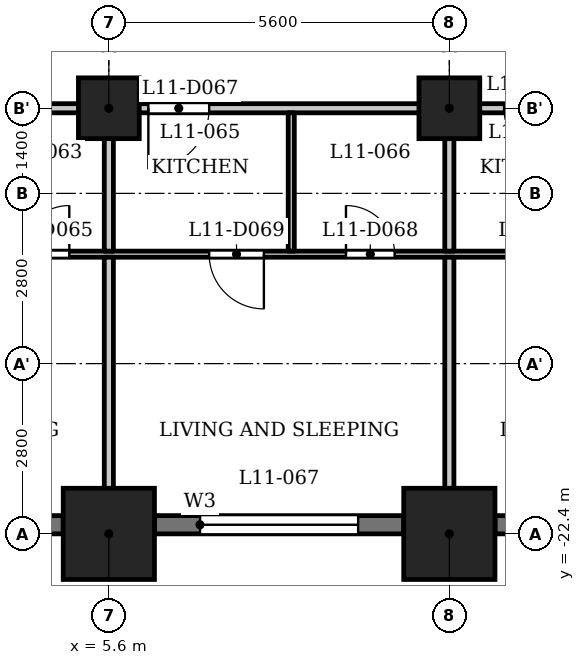
"""IFC4 building model, lengths in metres.
Left out: names, types, materials, properties, quantities, classifications, styles, units other than length and angle.
Written with IfcOpenShell. Run it as: python <this file> out.ifc"""

import sys

from ifc_helpers import new_model, si_unit, direction, frame, frame_2d, origin, origin_2d, place, context, subcontext, project, spatial, rectangle, extrude, element, fill, save


model = new_model("IFC4")
c1 = context("Model", 3, precision=1e-05, world=origin(), true_north=direction((0.0, 1.0)))
c2 = subcontext(c1, "Body", "Model", "MODEL_VIEW")
j1 = project(units=[si_unit("LENGTHUNIT", "METRE"), si_unit("PLANEANGLEUNIT", "RADIAN")], contexts=[c1])
p1 = place(None, origin())
s1 = spatial("IfcSite", under=j1, at=p1, CompositionType="ELEMENT")
p2 = place(p1, origin())
s2 = spatial("IfcBuilding", under=s1, at=p2, CompositionType="ELEMENT")
p3 = place(p2, frame((0.0, 0.0, 48.0)))
s3 = spatial("IfcBuildingStorey", under=s2, at=p3, CompositionType="ELEMENT", Elevation=48.0)
for number, where, z_axis, x_axis in (
    (1, (5.6, -22.4, 0.0), (0.0, 0.0, 1.0), (1.0, 0.0, 0.0)),
    (2, (11.2, -22.4, 0.0), (0.0, 0.0, 1.0), (1.0, 0.0, 0.0)),
):
    element("IfcColumn", number, at=place(p3, frame(where, z_axis=z_axis, x_axis=x_axis)), inside=s3, PredefinedType="COLUMN", context=c2, shape_type="SweptSolid", body=[
        extrude(rectangle(XDim=1.5, YDim=1.5, at=origin_2d()), origin(), (0.0, 0.0, 1.0), 3.5),
    ])
for number, where, z_axis, x_axis in (
    (3, (5.6, -15.4, 0.0), (0.0, 0.0, 1.0), (1.0, 0.0, 0.0)),
    (4, (11.2, -15.4, 0.0), (0.0, 0.0, 1.0), (1.0, 0.0, 0.0)),
):
    element("IfcColumn", number, at=place(p3, frame(where, z_axis=z_axis, x_axis=x_axis)), inside=s3, PredefinedType="COLUMN", context=c2, shape_type="SweptSolid", body=[
        extrude(rectangle(XDim=1.0, YDim=1.0, at=origin_2d()), origin(), (0.0, 0.0, 1.0), 3.5),
    ])
p4 = place(p3, frame((0.75, -22.25, 0.0), z_axis=(0.0, 0.0, 1.0), x_axis=(1.0, 0.0, 0.0)))
e5 = element("IfcWall", 5, at=p4, inside=s3, PredefinedType="SOLIDWALL", context=c2, shape_type="SweptSolid", body=[
    extrude(rectangle(XDim=4.1, YDim=0.3, at=frame_2d((2.05, 0.0))), origin(), (0.0, 0.0, 1.0), 2.35),
])
p5 = place(p4, frame((0.25, 0.0, 1.2)))
e6 = element("IfcOpeningElement", 6, at=p5, cuts=e5, PredefinedType="OPENING", context=c2, shape_type="SweptSolid", body=[
    extrude(rectangle(XDim=3.6, YDim=0.95, at=frame_2d((1.8, 0.475))), frame((0.0, 0.16, 0.0), z_axis=(0.0, -1.0, 0.0), x_axis=(1.0, 0.0, 0.0)), (0.0, 0.0, 1.0), 0.32),
])
p6 = place(p3, frame((6.35, -22.25, 0.0), z_axis=(0.0, 0.0, 1.0), x_axis=(1.0, 0.0, 0.0)))
e7 = element("IfcWall", 7, at=p6, inside=s3, PredefinedType="SOLIDWALL", context=c2, shape_type="SweptSolid", body=[
    extrude(rectangle(XDim=4.1, YDim=0.3, at=frame_2d((2.05, 0.0))), origin(), (0.0, 0.0, 1.0), 2.35),
])
p7 = place(p6, frame((0.75, 0.0, 0.9)))
e8 = element("IfcOpeningElement", 8, at=p7, cuts=e7, PredefinedType="OPENING", context=c2, shape_type="SweptSolid", body=[
    extrude(rectangle(XDim=2.6, YDim=1.25, at=frame_2d((1.3, 0.625))), frame((0.0, 0.16, 0.0), z_axis=(0.0, -1.0, 0.0), x_axis=(1.0, 0.0, 0.0)), (0.0, 0.0, 1.0), 0.32),
])
p8 = place(p3, frame((11.95, -22.25, 0.0), z_axis=(0.0, 0.0, 1.0), x_axis=(1.0, 0.0, 0.0)))
e9 = element("IfcWall", 9, at=p8, inside=s3, PredefinedType="SOLIDWALL", context=c2, shape_type="SweptSolid", body=[
    extrude(rectangle(XDim=4.1, YDim=0.3, at=frame_2d((2.05, 0.0))), origin(), (0.0, 0.0, 1.0), 2.35),
])
p9 = place(p8, frame((0.75, 0.0, 0.9)))
e10 = element("IfcOpeningElement", 10, at=p9, cuts=e9, PredefinedType="OPENING", context=c2, shape_type="SweptSolid", body=[
    extrude(rectangle(XDim=2.6, YDim=1.25, at=frame_2d((1.3, 0.625))), frame((0.0, 0.16, 0.0), z_axis=(0.0, -1.0, 0.0), x_axis=(1.0, 0.0, 0.0)), (0.0, 0.0, 1.0), 0.32),
])
p10 = place(p3, frame((-26.394, -17.8, 0.0), z_axis=(0.0, 0.0, 1.0), x_axis=(1.0, 0.0, 0.0)))
e11 = element("IfcWall", 11, at=p10, inside=s3, PredefinedType="PARTITIONING", context=c2, shape_type="SweptSolid", body=[
    extrude(rectangle(XDim=53.126, YDim=0.1, at=frame_2d((26.563, 0.0))), origin(), (0.0, 0.0, 1.0), 3.2),
])
p11 = place(p10, frame((0.794, 0.0, 0.0)))
e12 = element("IfcOpeningElement", 12, at=p11, cuts=e11, PredefinedType="OPENING", context=c2, shape_type="SweptSolid", body=[
    extrude(rectangle(XDim=0.8, YDim=2.1, at=frame_2d((0.4, 1.05))), frame((0.0, 0.06, 0.0), z_axis=(0.0, -1.0, 0.0), x_axis=(1.0, 0.0, 0.0)), (0.0, 0.0, 1.0), 0.12),
])
p12 = place(p10, frame((5.644, 0.0, 0.0)))
e13 = element("IfcOpeningElement", 13, at=p12, cuts=e11, PredefinedType="OPENING", context=c2, shape_type="SweptSolid", body=[
    extrude(rectangle(XDim=0.9, YDim=2.1, at=frame_2d((0.45, 1.05))), frame((0.0, 0.06, 0.0), z_axis=(0.0, -1.0, 0.0), x_axis=(1.0, 0.0, 0.0)), (0.0, 0.0, 1.0), 0.12),
])
p13 = place(p10, frame((10.394, 0.0, 0.0)))
e14 = element("IfcOpeningElement", 14, at=p13, cuts=e11, PredefinedType="OPENING", context=c2, shape_type="SweptSolid", body=[
    extrude(rectangle(XDim=0.8, YDim=2.1, at=frame_2d((0.4, 1.05))), frame((0.0, 0.06, 0.0), z_axis=(0.0, -1.0, 0.0), x_axis=(1.0, 0.0, 0.0)), (0.0, 0.0, 1.0), 0.12),
])
p14 = place(p10, frame((13.244, 0.0, 0.0)))
e15 = element("IfcOpeningElement", 15, at=p14, cuts=e11, PredefinedType="OPENING", context=c2, shape_type="SweptSolid", body=[
    extrude(rectangle(XDim=0.9, YDim=2.1, at=frame_2d((0.45, 1.05))), frame((0.0, 0.06, 0.0), z_axis=(0.0, -1.0, 0.0), x_axis=(1.0, 0.0, 0.0)), (0.0, 0.0, 1.0), 0.12),
])
p15 = place(p10, frame((23.944, 0.0, 0.0)))
e16 = element("IfcOpeningElement", 16, at=p15, cuts=e11, PredefinedType="OPENING", context=c2, shape_type="SweptSolid", body=[
    extrude(rectangle(XDim=0.8, YDim=2.1, at=frame_2d((0.4, 1.05))), frame((0.0, 0.06, 0.0), z_axis=(0.0, -1.0, 0.0), x_axis=(1.0, 0.0, 0.0)), (0.0, 0.0, 1.0), 0.12),
])
p16 = place(p10, frame((22.194, 0.0, 0.0)))
e17 = element("IfcOpeningElement", 17, at=p16, cuts=e11, PredefinedType="OPENING", context=c2, shape_type="SweptSolid", body=[
    extrude(rectangle(XDim=0.9, YDim=2.1, at=frame_2d((0.45, 1.05))), frame((0.0, 0.06, 0.0), z_axis=(0.0, -1.0, 0.0), x_axis=(1.0, 0.0, 0.0)), (0.0, 0.0, 1.0), 0.12),
])
p17 = place(p10, frame((16.594, 0.0, 0.0)))
e18 = element("IfcOpeningElement", 18, at=p17, cuts=e11, PredefinedType="OPENING", context=c2, shape_type="SweptSolid", body=[
    extrude(rectangle(XDim=0.9, YDim=2.1, at=frame_2d((0.45, 1.05))), frame((0.0, 0.06, 0.0), z_axis=(0.0, -1.0, 0.0), x_axis=(1.0, 0.0, 0.0)), (0.0, 0.0, 1.0), 0.12),
])
p18 = place(p10, frame((18.844, 0.0, 0.0)))
e19 = element("IfcOpeningElement", 19, at=p18, cuts=e11, PredefinedType="OPENING", context=c2, shape_type="SweptSolid", body=[
    extrude(rectangle(XDim=0.9, YDim=2.1, at=frame_2d((0.45, 1.05))), frame((0.0, 0.06, 0.0), z_axis=(0.0, -1.0, 0.0), x_axis=(1.0, 0.0, 0.0)), (0.0, 0.0, 1.0), 0.12),
])
p19 = place(p10, frame((30.544, 0.0, 0.0)))
e20 = element("IfcOpeningElement", 20, at=p19, cuts=e11, PredefinedType="OPENING", context=c2, shape_type="SweptSolid", body=[
    extrude(rectangle(XDim=0.8, YDim=2.1, at=frame_2d((0.4, 1.05))), frame((0.0, 0.06, 0.0), z_axis=(0.0, -1.0, 0.0), x_axis=(1.0, 0.0, 0.0)), (0.0, 0.0, 1.0), 0.12),
])
p20 = place(p10, frame((27.294, 0.0, 0.0)))
e21 = element("IfcOpeningElement", 21, at=p20, cuts=e11, PredefinedType="OPENING", context=c2, shape_type="SweptSolid", body=[
    extrude(rectangle(XDim=0.9, YDim=2.1, at=frame_2d((0.45, 1.05))), frame((0.0, 0.06, 0.0), z_axis=(0.0, -1.0, 0.0), x_axis=(1.0, 0.0, 0.0)), (0.0, 0.0, 1.0), 0.12),
])
p21 = place(p10, frame((35.894, 0.0, 0.0)))
e22 = element("IfcOpeningElement", 22, at=p21, cuts=e11, PredefinedType="OPENING", context=c2, shape_type="SweptSolid", body=[
    extrude(rectangle(XDim=0.8, YDim=2.1, at=frame_2d((0.4, 1.05))), frame((0.0, 0.06, 0.0), z_axis=(0.0, -1.0, 0.0), x_axis=(1.0, 0.0, 0.0)), (0.0, 0.0, 1.0), 0.12),
])
p22 = place(p10, frame((33.644, 0.0, 0.0)))
e23 = element("IfcOpeningElement", 23, at=p22, cuts=e11, PredefinedType="OPENING", context=c2, shape_type="SweptSolid", body=[
    extrude(rectangle(XDim=0.9, YDim=2.1, at=frame_2d((0.45, 1.05))), frame((0.0, 0.06, 0.0), z_axis=(0.0, -1.0, 0.0), x_axis=(1.0, 0.0, 0.0)), (0.0, 0.0, 1.0), 0.12),
])
p23 = place(p10, frame((41.494, 0.0, 0.0)))
e24 = element("IfcOpeningElement", 24, at=p23, cuts=e11, PredefinedType="OPENING", context=c2, shape_type="SweptSolid", body=[
    extrude(rectangle(XDim=0.8, YDim=2.1, at=frame_2d((0.4, 1.05))), frame((0.0, 0.06, 0.0), z_axis=(0.0, -1.0, 0.0), x_axis=(1.0, 0.0, 0.0)), (0.0, 0.0, 1.0), 0.12),
])
p24 = place(p10, frame((38.744, 0.0, 0.0)))
e25 = element("IfcOpeningElement", 25, at=p24, cuts=e11, PredefinedType="OPENING", context=c2, shape_type="SweptSolid", body=[
    extrude(rectangle(XDim=0.9, YDim=2.1, at=frame_2d((0.45, 1.05))), frame((0.0, 0.06, 0.0), z_axis=(0.0, -1.0, 0.0), x_axis=(1.0, 0.0, 0.0)), (0.0, 0.0, 1.0), 0.12),
])
p25 = place(p10, frame((49.362, 0.0, 0.0)))
e26 = element("IfcOpeningElement", 26, at=p25, cuts=e11, PredefinedType="OPENING", context=c2, shape_type="SweptSolid", body=[
    extrude(rectangle(XDim=0.8, YDim=2.1, at=frame_2d((0.4, 1.05))), frame((0.0, 0.06, 0.0), z_axis=(0.0, -1.0, 0.0), x_axis=(1.0, 0.0, 0.0)), (0.0, 0.0, 1.0), 0.12),
])
p26 = place(p10, frame((45.094, 0.0, 0.0)))
e27 = element("IfcOpeningElement", 27, at=p26, cuts=e11, PredefinedType="OPENING", context=c2, shape_type="SweptSolid", body=[
    extrude(rectangle(XDim=0.9, YDim=2.1, at=frame_2d((0.45, 1.05))), frame((0.0, 0.06, 0.0), z_axis=(0.0, -1.0, 0.0), x_axis=(1.0, 0.0, 0.0)), (0.0, 0.0, 1.0), 0.12),
])
p27 = place(p3, frame((-27.484, -15.4, 0.0), z_axis=(0.0, 0.0, 1.0), x_axis=(1.0, 0.0, 0.0)))
e28 = element("IfcWall", 28, at=p27, inside=s3, PredefinedType="PARTITIONING", context=c2, shape_type="SweptSolid", body=[
    extrude(rectangle(XDim=54.968, YDim=0.15, at=frame_2d((27.484, 0.0))), origin(), (0.0, 0.0, 1.0), 3.2),
])
p28 = place(p27, frame((5.734, 0.0, 0.0)))
e29 = element("IfcOpeningElement", 29, at=p28, cuts=e28, PredefinedType="OPENING", context=c2, shape_type="SweptSolid", body=[
    extrude(rectangle(XDim=1.0, YDim=2.1, at=frame_2d((0.5, 1.05))), frame((0.0, 0.085, 0.0), z_axis=(0.0, -1.0, 0.0), x_axis=(1.0, 0.0, 0.0)), (0.0, 0.0, 1.0), 0.17),
])
p29 = place(p27, frame((13.334, 0.0, 0.0)))
e30 = element("IfcOpeningElement", 30, at=p29, cuts=e28, PredefinedType="OPENING", context=c2, shape_type="SweptSolid", body=[
    extrude(rectangle(XDim=1.0, YDim=2.1, at=frame_2d((0.5, 1.05))), frame((0.0, 0.085, 0.0), z_axis=(0.0, -1.0, 0.0), x_axis=(1.0, 0.0, 0.0)), (0.0, 0.0, 1.0), 0.17),
])
p30 = place(p27, frame((20.184, 0.0, 0.0)))
e31 = element("IfcOpeningElement", 31, at=p30, cuts=e28, PredefinedType="OPENING", context=c2, shape_type="SweptSolid", body=[
    extrude(rectangle(XDim=1.0, YDim=2.1, at=frame_2d((0.5, 1.05))), frame((0.0, 0.085, 0.0), z_axis=(0.0, -1.0, 0.0), x_axis=(1.0, 0.0, 0.0)), (0.0, 0.0, 1.0), 0.17),
])
p31 = place(p27, frame((29.384, 0.0, 0.0)))
e32 = element("IfcOpeningElement", 32, at=p31, cuts=e28, PredefinedType="OPENING", context=c2, shape_type="SweptSolid", body=[
    extrude(rectangle(XDim=1.0, YDim=2.1, at=frame_2d((0.5, 1.05))), frame((0.0, 0.085, 0.0), z_axis=(0.0, -1.0, 0.0), x_axis=(1.0, 0.0, 0.0)), (0.0, 0.0, 1.0), 0.17),
])
p32 = place(p27, frame((33.734, 0.0, 0.0)))
e33 = element("IfcOpeningElement", 33, at=p32, cuts=e28, PredefinedType="OPENING", context=c2, shape_type="SweptSolid", body=[
    extrude(rectangle(XDim=1.0, YDim=2.1, at=frame_2d((0.5, 1.05))), frame((0.0, 0.085, 0.0), z_axis=(0.0, -1.0, 0.0), x_axis=(1.0, 0.0, 0.0)), (0.0, 0.0, 1.0), 0.17),
])
p33 = place(p27, frame((39.584, 0.0, 0.0)))
e34 = element("IfcOpeningElement", 34, at=p33, cuts=e28, PredefinedType="OPENING", context=c2, shape_type="SweptSolid", body=[
    extrude(rectangle(XDim=1.0, YDim=2.1, at=frame_2d((0.5, 1.05))), frame((0.0, 0.085, 0.0), z_axis=(0.0, -1.0, 0.0), x_axis=(1.0, 0.0, 0.0)), (0.0, 0.0, 1.0), 0.17),
])
p34 = place(p27, frame((45.184, 0.0, 0.0)))
e35 = element("IfcOpeningElement", 35, at=p34, cuts=e28, PredefinedType="OPENING", context=c2, shape_type="SweptSolid", body=[
    extrude(rectangle(XDim=1.0, YDim=2.1, at=frame_2d((0.5, 1.05))), frame((0.0, 0.085, 0.0), z_axis=(0.0, -1.0, 0.0), x_axis=(1.0, 0.0, 0.0)), (0.0, 0.0, 1.0), 0.17),
])
p35 = place(p3, frame((5.6, -23.13, 0.0), z_axis=(0.0, 0.0, 1.0), x_axis=(0.0, 1.0, 0.0)))
e36 = element("IfcWall", 36, at=p35, inside=s3, PredefinedType="PARTITIONING", context=c2, shape_type="SweptSolid", body=[
    extrude(rectangle(XDim=5.28, YDim=0.15, at=frame_2d((2.64, 0.0))), origin(), (0.0, 0.0, 1.0), 3.2),
])
p36 = place(p3, frame((5.6, -17.75, 0.0), z_axis=(0.0, 0.0, 1.0), x_axis=(0.0, 1.0, 0.0)))
e37 = element("IfcWall", 37, at=p36, inside=s3, PredefinedType="PARTITIONING", context=c2, shape_type="SweptSolid", body=[
    extrude(rectangle(XDim=2.275, YDim=0.15, at=frame_2d((1.137, 0.0))), origin(), (0.0, 0.0, 1.0), 3.2),
])
p37 = place(p3, frame((8.6, -17.75, 0.0), z_axis=(0.0, 0.0, 1.0), x_axis=(0.0, 1.0, 0.0)))
e38 = element("IfcWall", 38, at=p37, inside=s3, PredefinedType="PARTITIONING", context=c2, shape_type="SweptSolid", body=[
    extrude(rectangle(XDim=2.275, YDim=0.1, at=frame_2d((1.137, 0.0))), origin(), (0.0, 0.0, 1.0), 3.2),
])
p38 = place(p3, frame((11.2, -23.13, 0.0), z_axis=(0.0, 0.0, 1.0), x_axis=(0.0, 1.0, 0.0)))
e39 = element("IfcWall", 39, at=p38, inside=s3, PredefinedType="PARTITIONING", context=c2, shape_type="SweptSolid", body=[
    extrude(rectangle(XDim=5.28, YDim=0.15, at=frame_2d((2.64, 0.0))), origin(), (0.0, 0.0, 1.0), 3.2),
])
p39 = place(p3, frame((11.2, -17.75, 0.0), z_axis=(0.0, 0.0, 1.0), x_axis=(0.0, 1.0, 0.0)))
e40 = element("IfcWall", 40, at=p39, inside=s3, PredefinedType="PARTITIONING", context=c2, shape_type="SweptSolid", body=[
    extrude(rectangle(XDim=2.275, YDim=0.15, at=frame_2d((1.137, 0.0))), origin(), (0.0, 0.0, 1.0), 3.2),
])
p40 = place(p19, origin())
e41 = element("IfcDoor", 41, at=p40, inside=s3, OperationType="SINGLE_SWING_LEFT", PredefinedType="DOOR", context=c2, shape_type="SweptSolid", body=[
    extrude(rectangle(XDim=0.8, YDim=2.1, at=frame_2d((0.4, 1.05))), frame((0.0, 0.025, 0.0), z_axis=(0.0, -1.0, 0.0), x_axis=(1.0, 0.0, 0.0)), (0.0, 0.0, 1.0), 0.05),
])
fill(e20, e41)
p41 = place(p32, origin())
e42 = element("IfcDoor", 42, at=p41, inside=s3, OperationType="SINGLE_SWING_LEFT", PredefinedType="DOOR", context=c2, shape_type="SweptSolid", body=[
    extrude(rectangle(XDim=1.0, YDim=2.1, at=frame_2d((0.5, 1.05))), frame((0.0, 0.025, 0.0), z_axis=(0.0, -1.0, 0.0), x_axis=(1.0, 0.0, 0.0)), (0.0, 0.0, 1.0), 0.05),
])
fill(e33, e42)
p42 = place(p21, origin())
e43 = element("IfcDoor", 43, at=p42, inside=s3, OperationType="SINGLE_SWING_RIGHT", PredefinedType="DOOR", context=c2, shape_type="SweptSolid", body=[
    extrude(rectangle(XDim=0.8, YDim=2.1, at=frame_2d((0.4, 1.05))), frame((0.0, 0.025, 0.0), z_axis=(0.0, -1.0, 0.0), x_axis=(1.0, 0.0, 0.0)), (0.0, 0.0, 1.0), 0.05),
])
fill(e22, e43)
p43 = place(p22, origin())
e44 = element("IfcDoor", 44, at=p43, inside=s3, OperationType="SINGLE_SWING_RIGHT", PredefinedType="DOOR", context=c2, shape_type="SweptSolid", body=[
    extrude(rectangle(XDim=0.9, YDim=2.1, at=frame_2d((0.45, 1.05))), frame((0.0, 0.025, 0.0), z_axis=(0.0, -1.0, 0.0), x_axis=(1.0, 0.0, 0.0)), (0.0, 0.0, 1.0), 0.05),
])
fill(e23, e44)
p44 = place(p33, origin())
e45 = element("IfcDoor", 45, at=p44, inside=s3, OperationType="SINGLE_SWING_RIGHT", PredefinedType="DOOR", context=c2, shape_type="SweptSolid", body=[
    extrude(rectangle(XDim=1.0, YDim=2.1, at=frame_2d((0.5, 1.05))), frame((0.0, 0.025, 0.0), z_axis=(0.0, -1.0, 0.0), x_axis=(1.0, 0.0, 0.0)), (0.0, 0.0, 1.0), 0.05),
])
fill(e34, e45)
p45 = place(p7, origin())
e46 = element("IfcWindow", 46, at=p45, inside=s3, PartitioningType="SINGLE_PANEL", PredefinedType="WINDOW", context=c2, shape_type="SweptSolid", body=[
    extrude(rectangle(XDim=2.6, YDim=1.25, at=frame_2d((1.3, 0.625))), frame((0.0, 0.03, 0.0), z_axis=(0.0, -1.0, 0.0), x_axis=(1.0, 0.0, 0.0)), (0.0, 0.0, 1.0), 0.06),
])
fill(e8, e46)
save(model, sys.argv[1])
